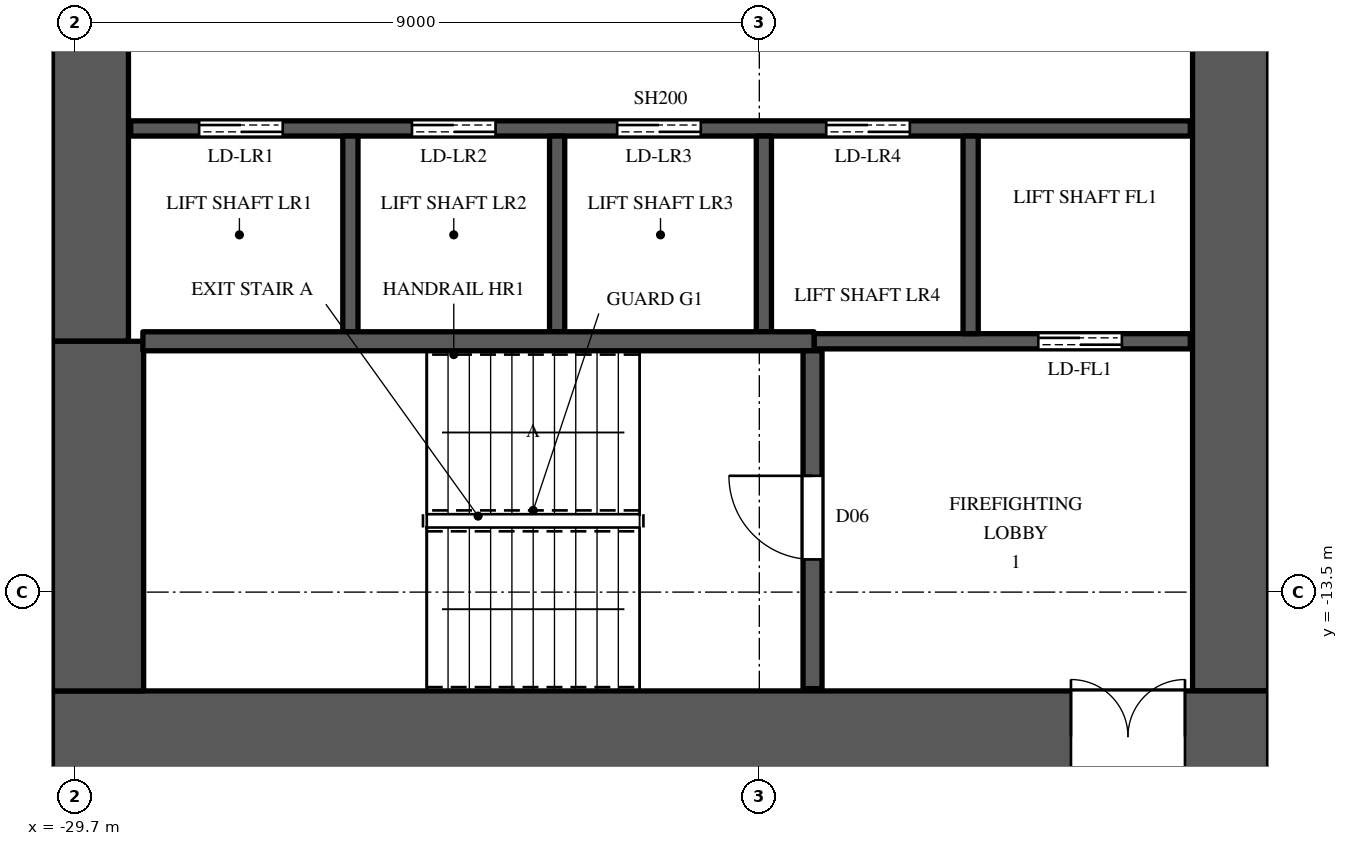
"""IFC4 building model, lengths in metres.
Left out: names, types, materials, properties, quantities, classifications, styles, units other than length and angle.
Written with IfcOpenShell. Run it as: python <this file> out.ifc"""

import sys

from ifc_helpers import new_model, si_unit, direction, frame, frame_2d, origin, place, context, subcontext, project, spatial, rectangle, extrude, element, fill, save


model = new_model("IFC4")
c1 = context("Model", 3, precision=1e-05, world=origin(), true_north=direction((0.0, 1.0)))
c2 = subcontext(c1, "Body", "Model", "MODEL_VIEW")
j1 = project(units=[si_unit("LENGTHUNIT", "METRE"), si_unit("PLANEANGLEUNIT", "RADIAN")], contexts=[c1])
p1 = place(None, origin())
s1 = spatial("IfcSite", under=j1, at=p1, CompositionType="ELEMENT")
p2 = place(p1, origin())
s2 = spatial("IfcBuilding", under=s1, at=p2, CompositionType="ELEMENT")
p3 = place(p2, frame((0.0, 0.0, 123.9)))
s3 = spatial("IfcBuildingStorey", under=s2, at=p3, CompositionType="ELEMENT", Elevation=123.9)
p4 = place(p3, frame((-30.0, -15.4, 0.0), z_axis=(0.0, 0.0, 1.0), x_axis=(1.0, 0.0, 0.0)))
e1 = element("IfcWall", 1, at=p4, inside=s3, PredefinedType="SHEAR", context=c2, shape_type="SweptSolid", body=[
    extrude(rectangle(XDim=16.0, YDim=1.2, at=frame_2d((8.0, 0.0))), origin(), (0.0, 0.0, 1.0), 3.6),
])
p5 = place(p4, frame((13.4, 0.0, 0.0)))
e2 = element("IfcOpeningElement", 2, at=p5, cuts=e1, PredefinedType="OPENING", context=c2, shape_type="SweptSolid", body=[
    extrude(rectangle(XDim=1.5, YDim=2.4, at=frame_2d((0.75, 1.2))), frame((0.0, 0.61, 0.0), z_axis=(0.0, -1.0, 0.0), x_axis=(1.0, 0.0, 0.0)), (0.0, 0.0, 1.0), 1.22),
])
p6 = place(p3, frame((-14.5, -14.8, 0.0), z_axis=(0.0, 0.0, 1.0), x_axis=(0.0, 1.0, 0.0)))
e3 = element("IfcWall", 3, at=p6, inside=s3, PredefinedType="SHEAR", context=c2, shape_type="SweptSolid", body=[
    extrude(rectangle(XDim=29.6, YDim=1.0, at=frame_2d((14.8, 0.0))), origin(), (0.0, 0.0, 1.0), 3.6),
])
p7 = place(p6, frame((8.45, 0.0, 0.0)))
e4 = element("IfcOpeningElement", 4, at=p7, cuts=e3, PredefinedType="OPENING", context=c2, shape_type="SweptSolid", body=[
    extrude(rectangle(XDim=1.5, YDim=2.4, at=frame_2d((0.75, 1.2))), frame((0.0, 0.51, 0.0), z_axis=(0.0, -1.0, 0.0), x_axis=(1.0, 0.0, 0.0)), (0.0, 0.0, 1.0), 1.02),
])
p8 = place(p6, frame((19.65, 0.0, 0.0)))
e5 = element("IfcOpeningElement", 5, at=p8, cuts=e3, PredefinedType="OPENING", context=c2, shape_type="SweptSolid", body=[
    extrude(rectangle(XDim=1.5, YDim=2.4, at=frame_2d((0.75, 1.2))), frame((0.0, 0.51, 0.0), z_axis=(0.0, -1.0, 0.0), x_axis=(1.0, 0.0, 0.0)), (0.0, 0.0, 1.0), 1.02),
])
p9 = place(p6, frame((14.5, 0.0, 0.0)))
e6 = element("IfcOpeningElement", 6, at=p9, cuts=e3, PredefinedType="OPENING", context=c2, shape_type="SweptSolid", body=[
    extrude(rectangle(XDim=0.6, YDim=2.0, at=frame_2d((0.3, 1.0))), frame((0.0, 0.51, 0.0), z_axis=(0.0, -1.0, 0.0), x_axis=(1.0, 0.0, 0.0)), (0.0, 0.0, 1.0), 1.02),
])
p10 = place(p3, frame((-29.5, -10.2, 0.0), z_axis=(0.0, 0.0, 1.0), x_axis=(0.0, 1.0, 0.0)))
e7 = element("IfcWall", 7, at=p10, inside=s3, PredefinedType="SHEAR", context=c2, shape_type="SweptSolid", body=[
    extrude(rectangle(XDim=20.4, YDim=1.0, at=frame_2d((10.2, 0.0))), origin(), (0.0, 0.0, 1.0), 3.6),
])
p11 = place(p3, frame((-29.4, -14.8, 0.0), z_axis=(0.0, 0.0, 1.0), x_axis=(0.0, 1.0, 0.0)))
e8 = element("IfcWall", 8, at=p11, inside=s3, PredefinedType="SHEAR", context=c2, shape_type="SweptSolid", body=[
    extrude(rectangle(XDim=4.6, YDim=1.2, at=frame_2d((2.3, 0.0))), origin(), (0.0, 0.0, 1.0), 3.6),
])
p12 = place(p3, frame((-28.97, -7.4, 0.0), z_axis=(0.0, 0.0, 1.0), x_axis=(1.0, 0.0, 0.0)))
e9 = element("IfcWall", 9, at=p12, inside=s3, PredefinedType="SHEAR", context=c2, shape_type="SweptSolid", body=[
    extrude(rectangle(XDim=13.94, YDim=0.2, at=frame_2d((6.97, 0.0))), origin(), (0.0, 0.0, 1.0), 3.3),
])
p13 = place(p12, frame((0.9, 0.0, 0.0)))
e10 = element("IfcOpeningElement", 10, at=p13, cuts=e9, PredefinedType="OPENING", context=c2, shape_type="SweptSolid", body=[
    extrude(rectangle(XDim=1.1, YDim=2.2, at=frame_2d((0.55, 1.1))), frame((0.0, 0.11, 0.0), z_axis=(0.0, -1.0, 0.0), x_axis=(1.0, 0.0, 0.0)), (0.0, 0.0, 1.0), 0.22),
])
p14 = place(p12, frame((3.7, 0.0, 0.0)))
e11 = element("IfcOpeningElement", 11, at=p14, cuts=e9, PredefinedType="OPENING", context=c2, shape_type="SweptSolid", body=[
    extrude(rectangle(XDim=1.1, YDim=2.2, at=frame_2d((0.55, 1.1))), frame((0.0, 0.11, 0.0), z_axis=(0.0, -1.0, 0.0), x_axis=(1.0, 0.0, 0.0)), (0.0, 0.0, 1.0), 0.22),
])
p15 = place(p12, frame((6.4, 0.0, 0.0)))
e12 = element("IfcOpeningElement", 12, at=p15, cuts=e9, PredefinedType="OPENING", context=c2, shape_type="SweptSolid", body=[
    extrude(rectangle(XDim=1.1, YDim=2.2, at=frame_2d((0.55, 1.1))), frame((0.0, 0.11, 0.0), z_axis=(0.0, -1.0, 0.0), x_axis=(1.0, 0.0, 0.0)), (0.0, 0.0, 1.0), 0.22),
])
p16 = place(p12, frame((9.15, 0.0, 0.0)))
e13 = element("IfcOpeningElement", 13, at=p16, cuts=e9, PredefinedType="OPENING", context=c2, shape_type="SweptSolid", body=[
    extrude(rectangle(XDim=1.1, YDim=2.2, at=frame_2d((0.55, 1.1))), frame((0.0, 0.11, 0.0), z_axis=(0.0, -1.0, 0.0), x_axis=(1.0, 0.0, 0.0)), (0.0, 0.0, 1.0), 0.22),
])
for number, where, z_axis, x_axis in (
    (14, (-26.08, -10.075, 0.0), (0.0, 0.0, 1.0), (0.0, 1.0, 0.0)),
    (15, (-23.36, -10.075, 0.0), (0.0, 0.0, 1.0), (0.0, 1.0, 0.0)),
    (16, (-20.64, -10.075, 0.0), (0.0, 0.0, 1.0), (0.0, 1.0, 0.0)),
):
    element("IfcWall", number, at=place(p3, frame(where, z_axis=z_axis, x_axis=x_axis)), inside=s3, PredefinedType="SHEAR", context=c2, shape_type="SweptSolid", body=[
        extrude(rectangle(XDim=2.575, YDim=0.2, at=frame_2d((1.288, 0.0))), origin(), (0.0, 0.0, 1.0), 3.6),
    ])
p17 = place(p3, frame((-19.98, -10.2, 0.0), z_axis=(0.0, 0.0, 1.0), x_axis=(1.0, 0.0, 0.0)))
e17 = element("IfcWall", 17, at=p17, inside=s3, PredefinedType="SHEAR", context=c2, shape_type="SweptSolid", body=[
    extrude(rectangle(XDim=4.95, YDim=0.2, at=frame_2d((2.475, 0.0))), origin(), (0.0, 0.0, 1.0), 3.3),
])
p18 = place(p17, frame((2.95, 0.0, 0.0)))
e18 = element("IfcOpeningElement", 18, at=p18, cuts=e17, PredefinedType="OPENING", context=c2, shape_type="SweptSolid", body=[
    extrude(rectangle(XDim=1.1, YDim=2.2, at=frame_2d((0.55, 1.1))), frame((0.0, 0.11, 0.0), z_axis=(0.0, -1.0, 0.0), x_axis=(1.0, 0.0, 0.0)), (0.0, 0.0, 1.0), 0.22),
])
p19 = place(p3, frame((-17.92, -10.1, 0.0), z_axis=(0.0, 0.0, 1.0), x_axis=(0.0, 1.0, 0.0)))
e19 = element("IfcWall", 19, at=p19, inside=s3, PredefinedType="SHEAR", context=c2, shape_type="SweptSolid", body=[
    extrude(rectangle(XDim=2.6, YDim=0.2, at=frame_2d((1.3, 0.0))), origin(), (0.0, 0.0, 1.0), 3.6),
])
p20 = place(p3, frame((-28.81, -10.2, 0.0), z_axis=(0.0, 0.0, 1.0), x_axis=(1.0, 0.0, 0.0)))
e20 = element("IfcWall", 20, at=p20, inside=s3, PredefinedType="SHEAR", context=c2, shape_type="SweptSolid", body=[
    extrude(rectangle(XDim=8.83, YDim=0.25, at=frame_2d((4.415, 0.0))), origin(), (0.0, 0.0, 1.0), 3.3),
])
p21 = place(p3, frame((-20.0, -14.77, 0.0), z_axis=(0.0, 0.0, 1.0), x_axis=(0.0, 1.0, 0.0)))
e21 = element("IfcWall", 21, at=p21, inside=s3, PredefinedType="SHEAR", context=c2, shape_type="SweptSolid", body=[
    extrude(rectangle(XDim=4.445, YDim=0.25, at=frame_2d((2.223, 0.0))), origin(), (0.0, 0.0, 1.0), 3.3),
])
p22 = place(p21, frame((1.7, 0.0, 0.0)))
e22 = element("IfcOpeningElement", 22, at=p22, cuts=e21, PredefinedType="OPENING", context=c2, shape_type="SweptSolid", body=[
    extrude(rectangle(XDim=1.1, YDim=2.2, at=frame_2d((0.55, 1.1))), frame((0.0, 0.135, 0.0), z_axis=(0.0, -1.0, 0.0), x_axis=(1.0, 0.0, 0.0)), (0.0, 0.0, 1.0), 0.27),
])
p23 = place(p22, origin())
e23 = element("IfcDoor", 23, at=p23, inside=s3, OperationType="SINGLE_SWING_RIGHT", PredefinedType="DOOR", context=c2, shape_type="SweptSolid", body=[
    extrude(rectangle(XDim=1.1, YDim=2.2, at=frame_2d((0.55, 1.1))), frame((0.0, 0.025, 0.0), z_axis=(0.0, -1.0, 0.0), x_axis=(1.0, 0.0, 0.0)), (0.0, 0.0, 1.0), 0.05),
])
fill(e22, e23)
p24 = place(p13, origin())
e24 = element("IfcDoor", 24, at=p24, inside=s3, OperationType="DOUBLE_DOOR_SLIDING", PredefinedType="DOOR", context=c2, shape_type="SweptSolid", body=[
    extrude(rectangle(XDim=1.1, YDim=2.2, at=frame_2d((0.55, 1.1))), frame((0.0, 0.025, 0.0), z_axis=(0.0, -1.0, 0.0), x_axis=(1.0, 0.0, 0.0)), (0.0, 0.0, 1.0), 0.05),
])
fill(e10, e24)
p25 = place(p14, origin())
e25 = element("IfcDoor", 25, at=p25, inside=s3, OperationType="DOUBLE_DOOR_SLIDING", PredefinedType="DOOR", context=c2, shape_type="SweptSolid", body=[
    extrude(rectangle(XDim=1.1, YDim=2.2, at=frame_2d((0.55, 1.1))), frame((0.0, 0.025, 0.0), z_axis=(0.0, -1.0, 0.0), x_axis=(1.0, 0.0, 0.0)), (0.0, 0.0, 1.0), 0.05),
])
fill(e11, e25)
p26 = place(p15, origin())
e26 = element("IfcDoor", 26, at=p26, inside=s3, OperationType="DOUBLE_DOOR_SLIDING", PredefinedType="DOOR", context=c2, shape_type="SweptSolid", body=[
    extrude(rectangle(XDim=1.1, YDim=2.2, at=frame_2d((0.55, 1.1))), frame((0.0, 0.025, 0.0), z_axis=(0.0, -1.0, 0.0), x_axis=(1.0, 0.0, 0.0)), (0.0, 0.0, 1.0), 0.05),
])
fill(e12, e26)
p27 = place(p16, origin())
e27 = element("IfcDoor", 27, at=p27, inside=s3, OperationType="DOUBLE_DOOR_SLIDING", PredefinedType="DOOR", context=c2, shape_type="SweptSolid", body=[
    extrude(rectangle(XDim=1.1, YDim=2.2, at=frame_2d((0.55, 1.1))), frame((0.0, 0.025, 0.0), z_axis=(0.0, -1.0, 0.0), x_axis=(1.0, 0.0, 0.0)), (0.0, 0.0, 1.0), 0.05),
])
fill(e13, e27)
p28 = place(p18, origin())
e28 = element("IfcDoor", 28, at=p28, inside=s3, OperationType="DOUBLE_DOOR_SLIDING", PredefinedType="DOOR", context=c2, shape_type="SweptSolid", body=[
    extrude(rectangle(XDim=1.1, YDim=2.2, at=frame_2d((0.55, 1.1))), frame((0.0, 0.025, 0.0), z_axis=(0.0, -1.0, 0.0), x_axis=(1.0, 0.0, 0.0)), (0.0, 0.0, 1.0), 0.05),
])
fill(e18, e28)
p29 = place(p5, origin())
e29 = element("IfcDoor", 29, at=p29, inside=s3, OperationType="DOUBLE_DOOR_SINGLE_SWING", PredefinedType="DOOR", context=c2, shape_type="SweptSolid", body=[
    extrude(rectangle(XDim=1.5, YDim=2.4, at=frame_2d((0.75, 1.2))), frame((0.0, 0.025, 0.0), z_axis=(0.0, -1.0, 0.0), x_axis=(1.0, 0.0, 0.0)), (0.0, 0.0, 1.0), 0.05),
])
fill(e2, e29)
save(model, sys.argv[1])
